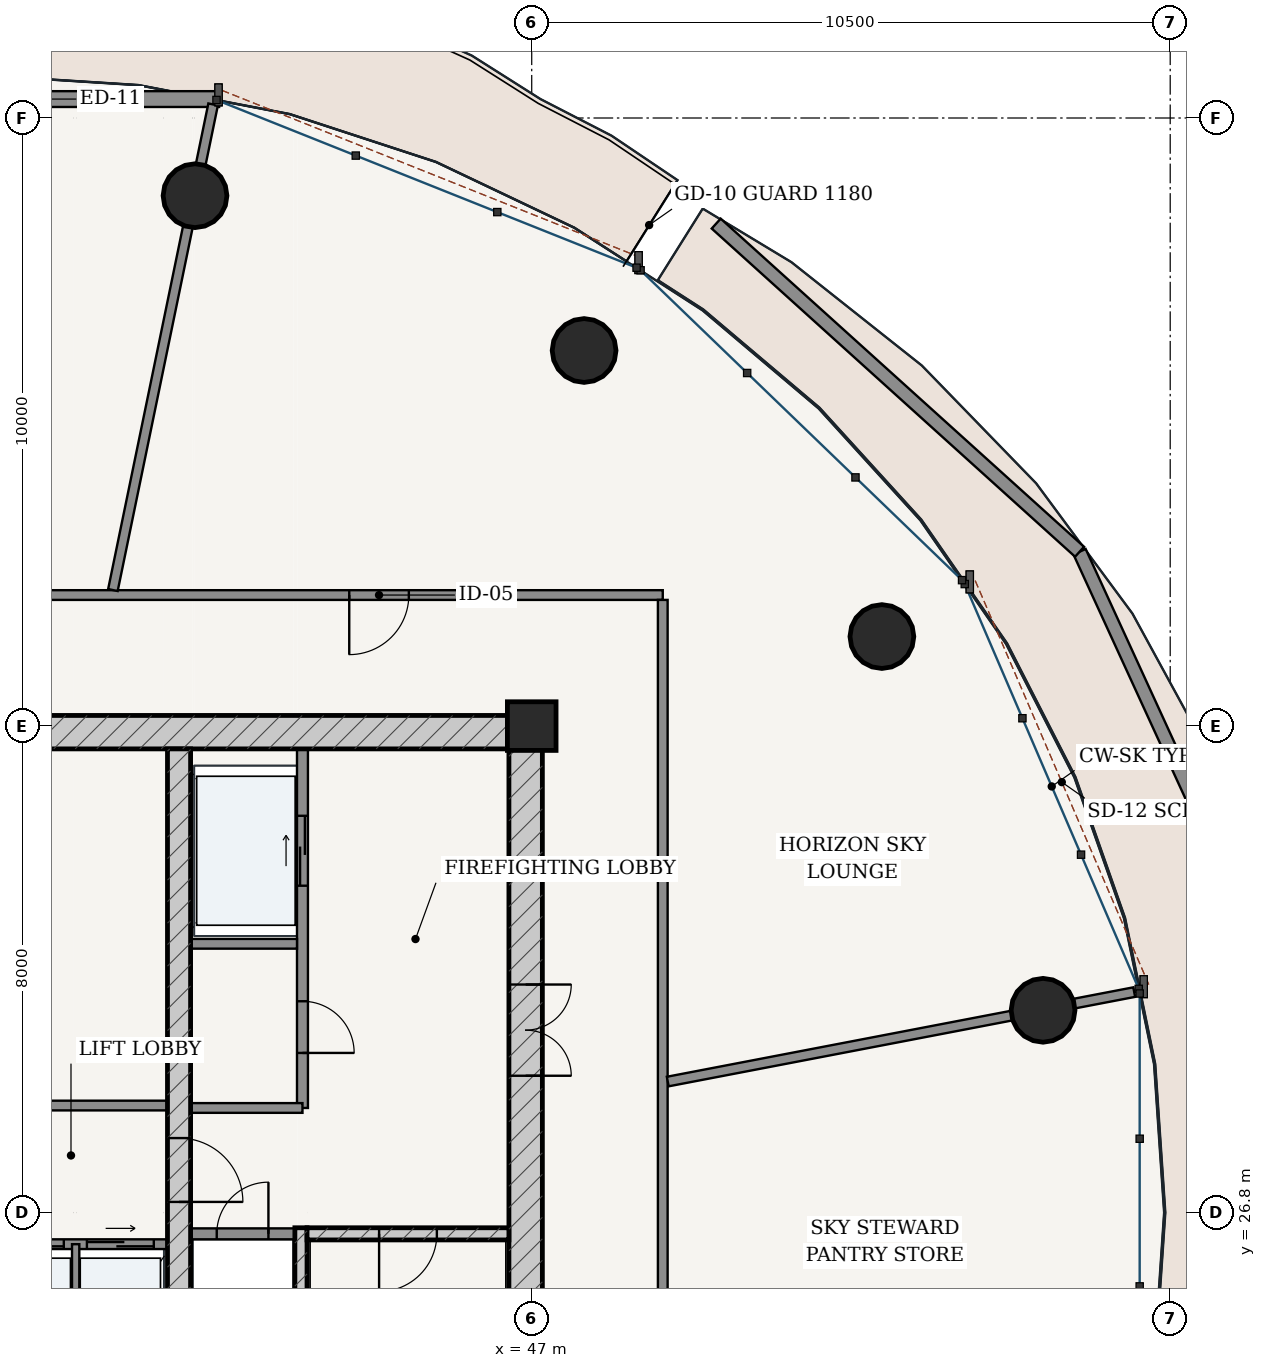
"""IFC4 building model, lengths in metres.
Left out: names, types, materials, properties, quantities, classifications, styles, units other than length and angle.
Written with IfcOpenShell. Run it as: python <this file> out.ifc"""

import sys

from ifc_helpers import new_model, si_unit, direction, frame, frame_2d, origin, origin_2d, place, context, subcontext, project, spatial, rectangle, hollow_circle, extrude, source, transform, mapped, element, fill, save


model = new_model("IFC4")
c1 = context("Model", 3, precision=1e-05, world=origin(), true_north=direction((-0.2419218956, 0.970295726276)))
c2 = subcontext(c1, "Body", "Model", "MODEL_VIEW")
j1 = project(units=[si_unit("LENGTHUNIT", "METRE"), si_unit("PLANEANGLEUNIT", "RADIAN")], contexts=[c1])
p1 = place(None, origin())
s1 = spatial("IfcSite", under=j1, at=p1, CompositionType="ELEMENT")
p2 = place(p1, origin())
s2 = spatial("IfcBuilding", under=s1, at=p2, CompositionType="ELEMENT")
p3 = place(p2, frame((0.0, 0.0, 243.0)))
s3 = spatial("IfcBuildingStorey", under=s2, at=p3, CompositionType="ELEMENT", Elevation=243.0)
p4 = place(p3, frame((47.0, 34.8, 0.0), z_axis=(0.0, 0.0, 1.0), x_axis=(1.0, 0.0, 0.0)))
e1 = element("IfcColumn", 1, at=p4, inside=s3, PredefinedType="COLUMN", context=c2, shape_type="SweptSolid", body=[
    extrude(rectangle(XDim=0.8, YDim=0.8, at=origin_2d()), origin(), (0.0, 0.0, 1.0), 5.2),
])
p5 = place(p3, frame((28.825, 34.7, 0.0), z_axis=(0.0, 0.0, 1.0), x_axis=(1.0, 0.0, 0.0)))
e2 = element("IfcWall", 2, at=p5, inside=s3, PredefinedType="SHEAR", context=c2, shape_type="SweptSolid", body=[
    extrude(rectangle(XDim=18.35, YDim=0.55, at=frame_2d((9.175, 0.0))), origin(), (0.0, 0.0, 1.0), 4.94),
])
p6 = place(p3, frame((46.9, 19.175, 0.0), z_axis=(0.0, 0.0, 1.0), x_axis=(0.0, 1.0, 0.0)))
e3 = element("IfcWall", 3, at=p6, inside=s3, PredefinedType="SHEAR", context=c2, shape_type="SweptSolid", body=[
    extrude(rectangle(XDim=15.25, YDim=0.55, at=frame_2d((7.625, 0.0))), origin(), (0.0, 0.0, 1.0), 4.94),
])
p7 = place(p6, frame((9.875, 0.0, 0.0)))
e4 = element("IfcOpeningElement", 4, at=p7, cuts=e3, PredefinedType="OPENING", context=c2, shape_type="SweptSolid", body=[
    extrude(rectangle(XDim=1.5, YDim=2.2, at=frame_2d((0.75, 1.1))), frame((0.0, 0.285, 0.0), z_axis=(0.0, -1.0, 0.0), x_axis=(1.0, 0.0, 0.0)), (0.0, 0.0, 1.0), 0.57),
])
p8 = place(p3, frame((43.205, 19.175, 0.0), z_axis=(0.0, 0.0, 1.0), x_axis=(0.0, 1.0, 0.0)))
e5 = element("IfcWall", 5, at=p8, inside=s3, PredefinedType="SOLIDWALL", context=c2, shape_type="SweptSolid", body=[
    extrude(rectangle(XDim=7.375, YDim=0.2, at=frame_2d((3.688, 0.0))), origin(), (0.0, 0.0, 1.0), 4.94),
])
p9 = place(p3, frame((43.305, 26.45, 0.0), z_axis=(0.0, 0.0, 1.0), x_axis=(1.0, 0.0, 0.0)))
e6 = element("IfcWall", 6, at=p9, inside=s3, PredefinedType="SOLIDWALL", context=c2, shape_type="SweptSolid", body=[
    extrude(rectangle(XDim=3.32, YDim=0.2, at=frame_2d((1.66, 0.0))), origin(), (0.0, 0.0, 1.0), 4.94),
])
p10 = place(p9, frame((1.185, 0.0, 0.0)))
e7 = element("IfcOpeningElement", 7, at=p10, cuts=e6, PredefinedType="OPENING", context=c2, shape_type="SweptSolid", body=[
    extrude(rectangle(XDim=0.95, YDim=2.15, at=frame_2d((0.475, 1.075))), frame((0.0, 0.11, 0.0), z_axis=(0.0, -1.0, 0.0), x_axis=(1.0, 0.0, 0.0)), (0.0, 0.0, 1.0), 0.22),
])
p11 = place(p3, frame((41.2, 19.175, 0.0), z_axis=(0.0, 0.0, 1.0), x_axis=(0.0, 1.0, 0.0)))
e8 = element("IfcWall", 8, at=p11, inside=s3, PredefinedType="SHEAR", context=c2, shape_type="SweptSolid", body=[
    extrude(rectangle(XDim=15.25, YDim=0.38, at=frame_2d((7.625, 0.0))), origin(), (0.0, 0.0, 1.0), 4.94),
])
p12 = place(p11, frame((7.8, 0.0, 0.0)))
e9 = element("IfcOpeningElement", 9, at=p12, cuts=e8, PredefinedType="OPENING", context=c2, shape_type="SweptSolid", body=[
    extrude(rectangle(XDim=1.05, YDim=2.15, at=frame_2d((0.525, 1.075))), frame((0.0, 0.2, 0.0), z_axis=(0.0, -1.0, 0.0), x_axis=(1.0, 0.0, 0.0)), (0.0, 0.0, 1.0), 0.4),
])
for number, where, z_axis, x_axis in (
    (10, (55.409, 30.126, 0.0), (0.0, 0.0, 1.0), (1.0, 0.0, 0.0)),
    (11, (52.759, 36.272, 0.0), (0.0, 0.0, 1.0), (1.0, 0.0, 0.0)),
    (12, (47.861, 40.977, 0.0), (0.0, 0.0, 1.0), (1.0, 0.0, 0.0)),
    (13, (41.463, 43.522, 0.0), (0.0, 0.0, 1.0), (1.0, 0.0, 0.0)),
):
    element("IfcColumn", number, at=place(p3, frame(where, z_axis=z_axis, x_axis=x_axis)), inside=s3, PredefinedType="COLUMN", context=c2, shape_type="SweptSolid", body=[
        extrude(hollow_circle(Radius=0.525, WallThickness=0.035, at=origin_2d()), origin(), (0.0, 0.0, 1.0), 5.2),
    ])
p13 = place(p3, frame((41.859, 45.111, 0.0), z_axis=(0.0, 0.0, 1.0), x_axis=(-1.0, 0.0, 0.0)))
e14 = element("IfcWall", 14, at=p13, inside=s3, PredefinedType="SOLIDWALL", context=c2, shape_type="SweptSolid", body=[
    extrude(rectangle(XDim=7.718, YDim=0.26, at=frame_2d((3.859, 0.0))), origin(), (0.0, 0.0, 1.0), 4.94),
])
p14 = place(p13, frame((2.959, 0.0, 0.0)))
e15 = element("IfcOpeningElement", 15, at=p14, cuts=e14, PredefinedType="OPENING", context=c2, shape_type="SweptSolid", body=[
    extrude(rectangle(XDim=1.8, YDim=2.3, at=frame_2d((0.9, 1.15))), frame((0.0, 0.14, 0.0), z_axis=(0.0, -1.0, 0.0), x_axis=(1.0, 0.0, 0.0)), (0.0, 0.0, 1.0), 0.28),
])
p15 = place(p3, frame((59.244, 30.616, 0.0), z_axis=(0.0, 0.0, 1.0), x_axis=(-0.416937529553, 0.908935144249, 0.0)))
e16 = element("IfcWall", 16, at=p15, inside=s3, PredefinedType="PARAPET", context=c2, shape_type="SweptSolid", body=[
    extrude(rectangle(XDim=7.758, YDim=0.22, at=frame_2d((3.879, 0.0))), origin(), (0.0, 0.0, 1.0), 1.15),
])
p16 = place(p3, frame((56.01, 37.667, 0.0), z_axis=(0.0, 0.0, 1.0), x_axis=(-0.742166860765, 0.670215152606, 0.0)))
e17 = element("IfcWall", 17, at=p16, inside=s3, PredefinedType="PARAPET", context=c2, shape_type="SweptSolid", body=[
    extrude(rectangle(XDim=8.052, YDim=0.22, at=frame_2d((4.026, 0.0))), origin(), (0.0, 0.0, 1.0), 1.15),
])
p17 = place(p3, frame((41.39, 26.45, 0.0), z_axis=(0.0, 0.0, 1.0), x_axis=(1.0, 0.0, 0.0)))
e18 = element("IfcWall", 18, at=p17, inside=s3, PredefinedType="PARTITIONING", context=c2, shape_type="SweptSolid", body=[
    extrude(rectangle(XDim=1.71, YDim=0.18, at=frame_2d((0.855, 0.0))), origin(), (0.0, 0.0, 1.0), 4.94),
])
p18 = place(p17, frame((0.43, 0.0, 0.0)))
e19 = element("IfcOpeningElement", 19, at=p18, cuts=e18, PredefinedType="OPENING", context=c2, shape_type="SweptSolid", body=[
    extrude(rectangle(XDim=0.85, YDim=2.1, at=frame_2d((0.425, 1.05))), frame((0.0, 0.1, 0.0), z_axis=(0.0, -1.0, 0.0), x_axis=(1.0, 0.0, 0.0)), (0.0, 0.0, 1.0), 0.2),
])
p19 = place(p3, frame((43.23, 28.52, 0.0), z_axis=(0.0, 0.0, 1.0), x_axis=(0.0, 1.0, 0.0)))
e20 = element("IfcWall", 20, at=p19, inside=s3, PredefinedType="PARTITIONING", context=c2, shape_type="SweptSolid", body=[
    extrude(rectangle(XDim=5.905, YDim=0.18, at=frame_2d((2.953, 0.0))), origin(), (0.0, 0.0, 1.0), 4.94),
])
p20 = place(p19, frame((0.905, 0.0, 0.0)))
e21 = element("IfcOpeningElement", 21, at=p20, cuts=e20, PredefinedType="OPENING", context=c2, shape_type="SweptSolid", body=[
    extrude(rectangle(XDim=0.85, YDim=2.1, at=frame_2d((0.425, 1.05))), frame((0.0, 0.1, 0.0), z_axis=(0.0, -1.0, 0.0), x_axis=(1.0, 0.0, 0.0)), (0.0, 0.0, 1.0), 0.2),
])
p21 = place(p19, frame((3.655, 0.0, 0.0)))
e22 = element("IfcOpeningElement", 22, at=p21, cuts=e20, PredefinedType="OPENING", context=c2, shape_type="SweptSolid", body=[
    extrude(rectangle(XDim=1.15, YDim=2.2, at=frame_2d((0.575, 1.1))), frame((0.0, 0.1, 0.0), z_axis=(0.0, -1.0, 0.0), x_axis=(1.0, 0.0, 0.0)), (0.0, 0.0, 1.0), 0.2),
])
p22 = place(p3, frame((41.39, 31.22, 0.0), z_axis=(0.0, 0.0, 1.0), x_axis=(1.0, 0.0, 0.0)))
e23 = element("IfcWall", 23, at=p22, inside=s3, PredefinedType="PARTITIONING", context=c2, shape_type="SweptSolid", body=[
    extrude(rectangle(XDim=1.75, YDim=0.16, at=frame_2d((0.875, 0.0))), origin(), (0.0, 0.0, 1.0), 4.94),
])
p23 = place(p3, frame((41.39, 28.52, 0.0), z_axis=(0.0, 0.0, 1.0), x_axis=(1.0, 0.0, 0.0)))
e24 = element("IfcWall", 24, at=p23, inside=s3, PredefinedType="PARTITIONING", context=c2, shape_type="SweptSolid", body=[
    extrude(rectangle(XDim=1.84, YDim=0.16, at=frame_2d((0.92, 0.0))), origin(), (0.0, 0.0, 1.0), 4.94),
])
p24 = place(p3, frame((34.99, 28.56, 0.0), z_axis=(0.0, 0.0, 1.0), x_axis=(1.0, 0.0, 0.0)))
e25 = element("IfcWall", 25, at=p24, inside=s3, PredefinedType="PARTITIONING", context=c2, shape_type="SweptSolid", body=[
    extrude(rectangle(XDim=6.02, YDim=0.16, at=frame_2d((3.01, 0.0))), origin(), (0.0, 0.0, 1.0), 4.94),
])
p25 = place(p24, frame((2.585, 0.0, 0.0)))
e26 = element("IfcOpeningElement", 26, at=p25, cuts=e25, PredefinedType="OPENING", context=c2, shape_type="SweptSolid", body=[
    extrude(rectangle(XDim=0.85, YDim=2.1, at=frame_2d((0.425, 1.05))), frame((0.0, 0.09, 0.0), z_axis=(0.0, -1.0, 0.0), x_axis=(1.0, 0.0, 0.0)), (0.0, 0.0, 1.0), 0.18),
])
p26 = place(p3, frame((34.99, 26.28, 0.0), z_axis=(0.0, 0.0, 1.0), x_axis=(1.0, 0.0, 0.0)))
e27 = element("IfcWall", 27, at=p26, inside=s3, PredefinedType="PARTITIONING", context=c2, shape_type="SweptSolid", body=[
    extrude(rectangle(XDim=6.02, YDim=0.16, at=frame_2d((3.01, 0.0))), origin(), (0.0, 0.0, 1.0), 4.94),
])
p27 = place(p26, frame((0.225, 0.0, 0.0)))
e28 = element("IfcOpeningElement", 28, at=p27, cuts=e27, PredefinedType="OPENING", context=c2, shape_type="SweptSolid", body=[
    extrude(rectangle(XDim=1.1, YDim=2.2, at=frame_2d((0.55, 1.1))), frame((0.0, 0.09, 0.0), z_axis=(0.0, -1.0, 0.0), x_axis=(1.0, 0.0, 0.0)), (0.0, 0.0, 1.0), 0.18),
])
p28 = place(p26, frame((1.705, 0.0, 0.0)))
e29 = element("IfcOpeningElement", 29, at=p28, cuts=e27, PredefinedType="OPENING", context=c2, shape_type="SweptSolid", body=[
    extrude(rectangle(XDim=1.1, YDim=2.2, at=frame_2d((0.55, 1.1))), frame((0.0, 0.09, 0.0), z_axis=(0.0, -1.0, 0.0), x_axis=(1.0, 0.0, 0.0)), (0.0, 0.0, 1.0), 0.18),
])
p29 = place(p26, frame((3.215, 0.0, 0.0)))
e30 = element("IfcOpeningElement", 30, at=p29, cuts=e27, PredefinedType="OPENING", context=c2, shape_type="SweptSolid", body=[
    extrude(rectangle(XDim=1.1, YDim=2.2, at=frame_2d((0.55, 1.1))), frame((0.0, 0.09, 0.0), z_axis=(0.0, -1.0, 0.0), x_axis=(1.0, 0.0, 0.0)), (0.0, 0.0, 1.0), 0.18),
])
p30 = place(p26, frame((4.695, 0.0, 0.0)))
e31 = element("IfcOpeningElement", 31, at=p30, cuts=e27, PredefinedType="OPENING", context=c2, shape_type="SweptSolid", body=[
    extrude(rectangle(XDim=1.1, YDim=2.2, at=frame_2d((0.55, 1.1))), frame((0.0, 0.09, 0.0), z_axis=(0.0, -1.0, 0.0), x_axis=(1.0, 0.0, 0.0)), (0.0, 0.0, 1.0), 0.18),
])
p31 = place(p3, frame((39.5, 23.72, 0.0), z_axis=(0.0, 0.0, 1.0), x_axis=(0.0, 1.0, 0.0)))
e32 = element("IfcWall", 32, at=p31, inside=s3, PredefinedType="PARTITIONING", context=c2, shape_type="SweptSolid", body=[
    extrude(rectangle(XDim=2.56, YDim=0.12, at=frame_2d((1.28, 0.0))), origin(), (0.0, 0.0, 1.0), 4.94),
])
p32 = place(p3, frame((26.845, 36.955, 0.0), z_axis=(0.0, 0.0, 1.0), x_axis=(1.0, 0.0, 0.0)))
e33 = element("IfcWall", 33, at=p32, inside=s3, PredefinedType="PARTITIONING", context=c2, shape_type="SweptSolid", body=[
    extrude(rectangle(XDim=22.31, YDim=0.16, at=frame_2d((11.155, 0.0))), origin(), (0.0, 0.0, 1.0), 4.465),
])
p33 = place(p32, frame((17.154, 0.0, 0.0)))
e34 = element("IfcOpeningElement", 34, at=p33, cuts=e33, PredefinedType="OPENING", context=c2, shape_type="SweptSolid", body=[
    extrude(rectangle(XDim=0.98, YDim=2.2, at=frame_2d((0.49, 1.1))), frame((0.0, 0.09, 0.0), z_axis=(0.0, -1.0, 0.0), x_axis=(1.0, 0.0, 0.0)), (0.0, 0.0, 1.0), 0.18),
])
p34 = place(p32, frame((6.288, 0.0, 0.0)))
e35 = element("IfcOpeningElement", 35, at=p34, cuts=e33, PredefinedType="OPENING", context=c2, shape_type="SweptSolid", body=[
    extrude(rectangle(XDim=0.98, YDim=2.2, at=frame_2d((0.49, 1.1))), frame((0.0, 0.09, 0.0), z_axis=(0.0, -1.0, 0.0), x_axis=(1.0, 0.0, 0.0)), (0.0, 0.0, 1.0), 0.18),
])
p35 = place(p3, frame((49.155, 16.725, 0.0), z_axis=(0.0, 0.0, 1.0), x_axis=(0.0, 1.0, 0.0)))
e36 = element("IfcWall", 36, at=p35, inside=s3, PredefinedType="PARTITIONING", context=c2, shape_type="SweptSolid", body=[
    extrude(rectangle(XDim=20.15, YDim=0.16, at=frame_2d((10.075, 0.0))), origin(), (0.0, 0.0, 1.0), 4.465),
])
p36 = place(p35, frame((7.036, 0.0, 0.0)))
e37 = element("IfcOpeningElement", 37, at=p36, cuts=e36, PredefinedType="OPENING", context=c2, shape_type="SweptSolid", body=[
    extrude(rectangle(XDim=0.98, YDim=2.2, at=frame_2d((0.49, 1.1))), frame((0.0, 0.09, 0.0), z_axis=(0.0, -1.0, 0.0), x_axis=(1.0, 0.0, 0.0)), (0.0, 0.0, 1.0), 0.18),
])
p37 = place(p3, frame((49.237, 28.955, 0.0), z_axis=(0.0, 0.0, 1.0), x_axis=(0.982113524201, 0.188289738385, 0.0)))
e38 = element("IfcWall", 38, at=p37, inside=s3, PredefinedType="PARTITIONING", context=c2, shape_type="SweptSolid", body=[
    extrude(rectangle(XDim=7.811, YDim=0.16, at=frame_2d((3.905, 0.0))), origin(), (0.0, 0.0, 1.0), 4.465),
])
p38 = place(p3, frame((40.113, 37.037, 0.0), z_axis=(0.0, 0.0, 1.0), x_axis=(0.202088793838, 0.979367203558, 0.0)))
e39 = element("IfcWall", 39, at=p38, inside=s3, PredefinedType="PARTITIONING", context=c2, shape_type="SweptSolid", body=[
    extrude(rectangle(XDim=8.155, YDim=0.16, at=frame_2d((4.077, 0.0))), origin(), (0.0, 0.0, 1.0), 4.465),
])
m1 = source(origin(), c2, "Body", "SweptSolid", [
    extrude(rectangle(XDim=1.5, YDim=2.2, at=frame_2d((0.75, 1.1))), frame((0.0, 0.025, 0.0), z_axis=(0.0, -1.0, 0.0), x_axis=(1.0, 0.0, 0.0)), (0.0, 0.0, 1.0), 0.05),
])
p39 = place(p7, frame((1.5, 0.0, 0.0), z_axis=(0.0, 0.0, 1.0), x_axis=(-1.0, 0.0, 0.0)))
e40 = element("IfcDoor", 40, at=p39, inside=s3, OperationType="DOUBLE_DOOR_SINGLE_SWING", PredefinedType="DOOR", context=c2, shape_type="MappedRepresentation", body=[
    mapped(m1, transform((0.0, 0.0, 0.0), scale=1.0)),
])
fill(e4, e40)
m2 = source(origin(), c2, "Body", "SweptSolid", [
    extrude(rectangle(XDim=1.05, YDim=2.15, at=frame_2d((0.525, 1.075))), frame((0.0, 0.025, 0.0), z_axis=(0.0, -1.0, 0.0), x_axis=(1.0, 0.0, 0.0)), (0.0, 0.0, 1.0), 0.05),
])
p40 = place(p12, frame((1.05, 0.0, 0.0), z_axis=(0.0, 0.0, 1.0), x_axis=(-1.0, 0.0, 0.0)))
e41 = element("IfcDoor", 41, at=p40, inside=s3, OperationType="SINGLE_SWING_RIGHT", PredefinedType="DOOR", context=c2, shape_type="MappedRepresentation", body=[
    mapped(m2, transform((0.0, 0.0, 0.0), scale=1.0)),
])
fill(e9, e41)
m3 = source(origin(), c2, "Body", "SweptSolid", [
    extrude(rectangle(XDim=0.95, YDim=2.15, at=frame_2d((0.475, 1.075))), frame((0.0, 0.025, 0.0), z_axis=(0.0, -1.0, 0.0), x_axis=(1.0, 0.0, 0.0)), (0.0, 0.0, 1.0), 0.05),
])
p41 = place(p10, frame((0.95, 0.0, 0.0), z_axis=(0.0, 0.0, 1.0), x_axis=(-1.0, 0.0, 0.0)))
e42 = element("IfcDoor", 42, at=p41, inside=s3, OperationType="SINGLE_SWING_RIGHT", PredefinedType="DOOR", context=c2, shape_type="MappedRepresentation", body=[
    mapped(m3, transform((0.0, 0.0, 0.0), scale=1.0)),
])
fill(e7, e42)
m4 = source(origin(), c2, "Body", "SweptSolid", [
    extrude(rectangle(XDim=0.85, YDim=2.1, at=frame_2d((0.425, 1.05))), frame((0.0, 0.025, 0.0), z_axis=(0.0, -1.0, 0.0), x_axis=(1.0, 0.0, 0.0)), (0.0, 0.0, 1.0), 0.05),
])
p42 = place(p18, origin())
e43 = element("IfcDoor", 43, at=p42, inside=s3, OperationType="SINGLE_SWING_RIGHT", PredefinedType="DOOR", context=c2, shape_type="MappedRepresentation", body=[
    mapped(m4, transform((0.0, 0.0, 0.0), scale=1.0)),
])
fill(e19, e43)
p43 = place(p20, frame((0.85, 0.0, 0.0), z_axis=(0.0, 0.0, 1.0), x_axis=(-1.0, 0.0, 0.0)))
e44 = element("IfcDoor", 44, at=p43, inside=s3, OperationType="SINGLE_SWING_RIGHT", PredefinedType="DOOR", context=c2, shape_type="MappedRepresentation", body=[
    mapped(m4, transform((0.0, 0.0, 0.0), scale=1.0)),
])
fill(e21, e44)
m5 = source(origin(), c2, "Body", "SweptSolid", [
    extrude(rectangle(XDim=1.15, YDim=2.2, at=frame_2d((0.575, 1.1))), frame((0.0, 0.025, 0.0), z_axis=(0.0, -1.0, 0.0), x_axis=(1.0, 0.0, 0.0)), (0.0, 0.0, 1.0), 0.05),
])
p44 = place(p21, origin())
e45 = element("IfcDoor", 45, at=p44, inside=s3, OperationType="DOUBLE_DOOR_SLIDING", PredefinedType="DOOR", context=c2, shape_type="MappedRepresentation", body=[
    mapped(m5, transform((0.0, 0.0, 0.0), scale=1.0)),
])
fill(e22, e45)
m6 = source(origin(), c2, "Body", "SweptSolid", [
    extrude(rectangle(XDim=1.1, YDim=2.2, at=frame_2d((0.55, 1.1))), frame((0.0, 0.025, 0.0), z_axis=(0.0, -1.0, 0.0), x_axis=(1.0, 0.0, 0.0)), (0.0, 0.0, 1.0), 0.05),
])
p45 = place(p29, origin())
e46 = element("IfcDoor", 46, at=p45, inside=s3, OperationType="DOUBLE_DOOR_SLIDING", PredefinedType="DOOR", context=c2, shape_type="MappedRepresentation", body=[
    mapped(m6, transform((0.0, 0.0, 0.0), scale=1.0)),
])
fill(e30, e46)
p46 = place(p30, origin())
e47 = element("IfcDoor", 47, at=p46, inside=s3, OperationType="DOUBLE_DOOR_SLIDING", PredefinedType="DOOR", context=c2, shape_type="MappedRepresentation", body=[
    mapped(m6, transform((0.0, 0.0, 0.0), scale=1.0)),
])
fill(e31, e47)
m7 = source(origin(), c2, "Body", "SweptSolid", [
    extrude(rectangle(XDim=0.98, YDim=2.2, at=frame_2d((0.49, 1.1))), frame((0.0, 0.025, 0.0), z_axis=(0.0, -1.0, 0.0), x_axis=(1.0, 0.0, 0.0)), (0.0, 0.0, 1.0), 0.05),
])
p47 = place(p33, frame((0.98, 0.0, 0.0), z_axis=(0.0, 0.0, 1.0), x_axis=(-1.0, 0.0, 0.0)))
e48 = element("IfcDoor", 48, at=p47, inside=s3, OperationType="SINGLE_SWING_RIGHT", PredefinedType="DOOR", context=c2, shape_type="MappedRepresentation", body=[
    mapped(m7, transform((0.0, 0.0, 0.0), scale=1.0)),
])
fill(e34, e48)
save(model, sys.argv[1])
